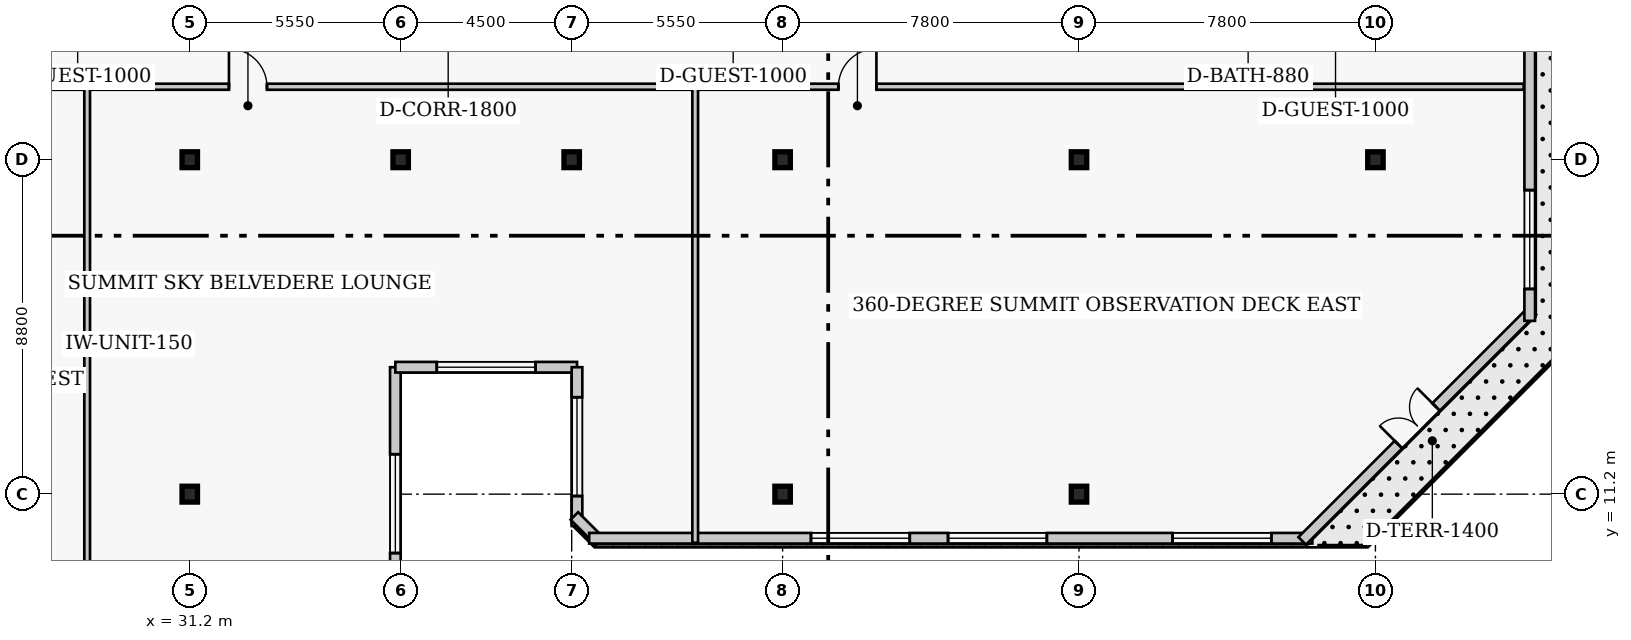
"""IFC4 building model, lengths in metres.
Left out: names, types, materials, properties, quantities, classifications, styles, units other than length and angle.
Written with IfcOpenShell. Run it as: python <this file> out.ifc"""

import sys

from ifc_helpers import new_model, si_unit, direction, frame, frame_2d, origin, origin_2d, place, context, subcontext, project, spatial, rectangle, i_section, extrude, element, fill, save


model = new_model("IFC4")
c1 = context("Model", 3, precision=1e-05, world=origin(), true_north=direction((0.0, 1.0)))
c2 = subcontext(c1, "Body", "Model", "MODEL_VIEW")
j1 = project(units=[si_unit("LENGTHUNIT", "METRE"), si_unit("PLANEANGLEUNIT", "RADIAN")], contexts=[c1])
p1 = place(None, origin())
s1 = spatial("IfcSite", under=j1, at=p1, CompositionType="ELEMENT")
p2 = place(p1, origin())
s2 = spatial("IfcBuilding", under=s1, at=p2, CompositionType="ELEMENT")
p3 = place(p2, frame((0.0, 0.0, 306.6)))
s3 = spatial("IfcBuildingStorey", under=s2, at=p3, CompositionType="ELEMENT", Elevation=306.6)
for number, where, z_axis, x_axis in (
    (1, (31.2, 11.2, 0.0), (0.0, 0.0, 1.0), (1.0, 0.0, 0.0)),
    (2, (31.2, 20.0, 0.0), (0.0, 0.0, 1.0), (1.0, 0.0, 0.0)),
    (3, (36.75, 20.0, 0.0), (0.0, 0.0, 1.0), (1.0, 0.0, 0.0)),
    (4, (41.25, 20.0, 0.0), (0.0, 0.0, 1.0), (1.0, 0.0, 0.0)),
    (5, (46.8, 11.2, 0.0), (0.0, 0.0, 1.0), (1.0, 0.0, 0.0)),
    (6, (46.8, 20.0, 0.0), (0.0, 0.0, 1.0), (1.0, 0.0, 0.0)),
    (7, (54.6, 11.2, 0.0), (0.0, 0.0, 1.0), (1.0, 0.0, 0.0)),
    (8, (54.6, 20.0, 0.0), (0.0, 0.0, 1.0), (1.0, 0.0, 0.0)),
    (9, (62.4, 20.0, 0.0), (0.0, 0.0, 1.0), (1.0, 0.0, 0.0)),
):
    element("IfcColumn", number, at=place(p3, frame(where, z_axis=z_axis, x_axis=x_axis)), inside=s3, PredefinedType="COLUMN", context=c2, shape_type="SweptSolid", body=[
        extrude(i_section(OverallWidth=0.406, OverallDepth=0.417, WebThickness=0.03, FlangeThickness=0.048, FilletRadius=0.017, at=origin_2d()), origin(), (0.0, 0.0, 1.0), 4.8),
    ])
p4 = place(p3, frame((36.61, 7.36, 0.0), z_axis=(0.0, 0.0, 1.0), x_axis=(0.0, 1.0, 0.0)))
e10 = element("IfcWall", 10, at=p4, inside=s3, PredefinedType="SOLIDWALL", context=c2, shape_type="SweptSolid", body=[
    extrude(rectangle(XDim=7.18, YDim=0.28, at=frame_2d((3.59, 0.0))), origin(), (0.0, 0.0, 1.0), 4.45),
])
p5 = place(p4, frame((2.29, 0.0, 0.65)))
e11 = element("IfcOpeningElement", 11, at=p5, cuts=e10, PredefinedType="OPENING", context=c2, shape_type="SweptSolid", body=[
    extrude(rectangle(XDim=2.6, YDim=2.2, at=frame_2d((1.3, 1.1))), frame((0.0, 0.15, 0.0), z_axis=(0.0, -1.0, 0.0), x_axis=(1.0, 0.0, 0.0)), (0.0, 0.0, 1.0), 0.3),
])
p6 = place(p3, frame((36.61, 14.54, 0.0), z_axis=(0.0, 0.0, 1.0), x_axis=(1.0, 0.0, 0.0)))
e12 = element("IfcWall", 12, at=p6, inside=s3, PredefinedType="SOLIDWALL", context=c2, shape_type="SweptSolid", body=[
    extrude(rectangle(XDim=4.78, YDim=0.28, at=frame_2d((2.39, 0.0))), origin(), (0.0, 0.0, 1.0), 4.45),
])
p7 = place(p6, frame((1.09, 0.0, 0.65)))
e13 = element("IfcOpeningElement", 13, at=p7, cuts=e12, PredefinedType="OPENING", context=c2, shape_type="SweptSolid", body=[
    extrude(rectangle(XDim=2.6, YDim=2.2, at=frame_2d((1.3, 1.1))), frame((0.0, 0.15, 0.0), z_axis=(0.0, -1.0, 0.0), x_axis=(1.0, 0.0, 0.0)), (0.0, 0.0, 1.0), 0.3),
])
p8 = place(p3, frame((41.39, 14.54, 0.0), z_axis=(0.0, 0.0, 1.0), x_axis=(0.0, -1.0, 0.0)))
e14 = element("IfcWall", 14, at=p8, inside=s3, PredefinedType="SOLIDWALL", context=c2, shape_type="SweptSolid", body=[
    extrude(rectangle(XDim=4.18, YDim=0.28, at=frame_2d((2.09, 0.0))), origin(), (0.0, 0.0, 1.0), 4.45),
])
p9 = place(p8, frame((0.79, 0.0, 0.65)))
e15 = element("IfcOpeningElement", 15, at=p9, cuts=e14, PredefinedType="OPENING", context=c2, shape_type="SweptSolid", body=[
    extrude(rectangle(XDim=2.6, YDim=2.2, at=frame_2d((1.3, 1.1))), frame((0.0, 0.15, 0.0), z_axis=(0.0, -1.0, 0.0), x_axis=(1.0, 0.0, 0.0)), (0.0, 0.0, 1.0), 0.3),
])
p10 = place(p3, frame((41.321, 10.627, 0.0), z_axis=(0.0, 0.0, 1.0), x_axis=(0.707106781187, -0.707106781187, 0.0)))
e16 = element("IfcWall", 16, at=p10, inside=s3, PredefinedType="SOLIDWALL", context=c2, shape_type="SweptSolid", body=[
    extrude(rectangle(XDim=0.928, YDim=0.28, at=frame_2d((0.464, 0.0))), origin(), (0.0, 0.0, 1.0), 4.45),
])
p11 = place(p3, frame((41.71, 10.04, 0.0), z_axis=(0.0, 0.0, 1.0), x_axis=(1.0, 0.0, 0.0)))
e17 = element("IfcWall", 17, at=p11, inside=s3, PredefinedType="SOLIDWALL", context=c2, shape_type="SweptSolid", body=[
    extrude(rectangle(XDim=19.03, YDim=0.28, at=frame_2d((9.515, 0.0))), origin(), (0.0, 0.0, 1.0), 4.45),
])
p12 = place(p11, frame((5.836, 0.0, 0.65)))
e18 = element("IfcOpeningElement", 18, at=p12, cuts=e17, PredefinedType="OPENING", context=c2, shape_type="SweptSolid", body=[
    extrude(rectangle(XDim=2.6, YDim=2.2, at=frame_2d((1.3, 1.1))), frame((0.0, 0.15, 0.0), z_axis=(0.0, -1.0, 0.0), x_axis=(1.0, 0.0, 0.0)), (0.0, 0.0, 1.0), 0.3),
])
p13 = place(p11, frame((9.444, 0.0, 0.65)))
e19 = element("IfcOpeningElement", 19, at=p13, cuts=e17, PredefinedType="OPENING", context=c2, shape_type="SweptSolid", body=[
    extrude(rectangle(XDim=2.6, YDim=2.2, at=frame_2d((1.3, 1.1))), frame((0.0, 0.15, 0.0), z_axis=(0.0, -1.0, 0.0), x_axis=(1.0, 0.0, 0.0)), (0.0, 0.0, 1.0), 0.3),
])
p14 = place(p11, frame((15.351, 0.0, 0.65)))
e20 = element("IfcOpeningElement", 20, at=p14, cuts=e17, PredefinedType="OPENING", context=c2, shape_type="SweptSolid", body=[
    extrude(rectangle(XDim=2.6, YDim=2.2, at=frame_2d((1.3, 1.1))), frame((0.0, 0.15, 0.0), z_axis=(0.0, -1.0, 0.0), x_axis=(1.0, 0.0, 0.0)), (0.0, 0.0, 1.0), 0.3),
])
p15 = place(p3, frame((60.473, 9.971, 0.0), z_axis=(0.0, 0.0, 1.0), x_axis=(0.707106781187, 0.707106781187, 0.0)))
e21 = element("IfcWall", 21, at=p15, inside=s3, PredefinedType="SOLIDWALL", context=c2, shape_type="SweptSolid", body=[
    extrude(rectangle(XDim=8.565, YDim=0.28, at=frame_2d((4.283, 0.0))), origin(), (0.0, 0.0, 1.0), 4.45),
])
p16 = place(p15, frame((3.583, 0.0, 0.0)))
e22 = element("IfcOpeningElement", 22, at=p16, cuts=e21, PredefinedType="OPENING", context=c2, shape_type="SweptSolid", body=[
    extrude(rectangle(XDim=1.4, YDim=2.15, at=frame_2d((0.7, 1.075))), frame((0.0, 0.15, 0.0), z_axis=(0.0, -1.0, 0.0), x_axis=(1.0, 0.0, 0.0)), (0.0, 0.0, 1.0), 0.3),
])
p17 = place(p3, frame((66.46, 15.76, 0.0), z_axis=(0.0, 0.0, 1.0), x_axis=(0.0, 1.0, 0.0)))
e23 = element("IfcWall", 23, at=p17, inside=s3, PredefinedType="SOLIDWALL", context=c2, shape_type="SweptSolid", body=[
    extrude(rectangle(XDim=25.68, YDim=0.28, at=frame_2d((12.84, 0.0))), origin(), (0.0, 0.0, 1.0), 4.45),
])
p18 = place(p17, frame((0.84, 0.0, 0.65)))
e24 = element("IfcOpeningElement", 24, at=p18, cuts=e23, PredefinedType="OPENING", context=c2, shape_type="SweptSolid", body=[
    extrude(rectangle(XDim=2.6, YDim=2.2, at=frame_2d((1.3, 1.1))), frame((0.0, 0.15, 0.0), z_axis=(0.0, -1.0, 0.0), x_axis=(1.0, 0.0, 0.0)), (0.0, 0.0, 1.0), 0.3),
])
p19 = place(p17, frame((9.4, 0.0, 0.65)))
e25 = element("IfcOpeningElement", 25, at=p19, cuts=e23, PredefinedType="OPENING", context=c2, shape_type="SweptSolid", body=[
    extrude(rectangle(XDim=2.6, YDim=2.2, at=frame_2d((1.3, 1.1))), frame((0.0, 0.15, 0.0), z_axis=(0.0, -1.0, 0.0), x_axis=(1.0, 0.0, 0.0)), (0.0, 0.0, 1.0), 0.3),
])
p20 = place(p17, frame((13.68, 0.0, 0.65)))
e26 = element("IfcOpeningElement", 26, at=p20, cuts=e23, PredefinedType="OPENING", context=c2, shape_type="SweptSolid", body=[
    extrude(rectangle(XDim=2.6, YDim=2.2, at=frame_2d((1.3, 1.1))), frame((0.0, 0.15, 0.0), z_axis=(0.0, -1.0, 0.0), x_axis=(1.0, 0.0, 0.0)), (0.0, 0.0, 1.0), 0.3),
])
p21 = place(p17, frame((17.96, 0.0, 0.65)))
e27 = element("IfcOpeningElement", 27, at=p21, cuts=e23, PredefinedType="OPENING", context=c2, shape_type="SweptSolid", body=[
    extrude(rectangle(XDim=2.6, YDim=2.2, at=frame_2d((1.3, 1.1))), frame((0.0, 0.15, 0.0), z_axis=(0.0, -1.0, 0.0), x_axis=(1.0, 0.0, 0.0)), (0.0, 0.0, 1.0), 0.3),
])
p22 = place(p17, frame((22.24, 0.0, 0.65)))
e28 = element("IfcOpeningElement", 28, at=p22, cuts=e23, PredefinedType="OPENING", context=c2, shape_type="SweptSolid", body=[
    extrude(rectangle(XDim=2.6, YDim=2.2, at=frame_2d((1.3, 1.1))), frame((0.0, 0.15, 0.0), z_axis=(0.0, -1.0, 0.0), x_axis=(1.0, 0.0, 0.0)), (0.0, 0.0, 1.0), 0.3),
])
p23 = place(p3, frame((11.7, 21.92, 0.0), z_axis=(0.0, 0.0, 1.0), x_axis=(1.0, 0.0, 0.0)))
e29 = element("IfcWall", 29, at=p23, inside=s3, PredefinedType="PARTITIONING", context=c2, shape_type="SweptSolid", body=[
    extrude(rectangle(XDim=54.6, YDim=0.16, at=frame_2d((27.3, 0.0))), origin(), (0.0, 0.0, 1.0), 4.45),
])
p24 = place(p23, frame((8.0, 0.0, 0.0)))
e30 = element("IfcOpeningElement", 30, at=p24, cuts=e29, PredefinedType="OPENING", context=c2, shape_type="SweptSolid", body=[
    extrude(rectangle(XDim=1.0, YDim=2.15, at=frame_2d((0.5, 1.075))), frame((0.0, 0.09, 0.0), z_axis=(0.0, -1.0, 0.0), x_axis=(1.0, 0.0, 0.0)), (0.0, 0.0, 1.0), 0.18),
])
p25 = place(p23, frame((20.531, 0.0, 0.0)))
e31 = element("IfcOpeningElement", 31, at=p25, cuts=e29, PredefinedType="OPENING", context=c2, shape_type="SweptSolid", body=[
    extrude(rectangle(XDim=1.0, YDim=2.15, at=frame_2d((0.5, 1.075))), frame((0.0, 0.09, 0.0), z_axis=(0.0, -1.0, 0.0), x_axis=(1.0, 0.0, 0.0)), (0.0, 0.0, 1.0), 0.18),
])
p26 = place(p23, frame((36.569, 0.0, 0.0)))
e32 = element("IfcOpeningElement", 32, at=p26, cuts=e29, PredefinedType="OPENING", context=c2, shape_type="SweptSolid", body=[
    extrude(rectangle(XDim=1.0, YDim=2.15, at=frame_2d((0.5, 1.075))), frame((0.0, 0.09, 0.0), z_axis=(0.0, -1.0, 0.0), x_axis=(1.0, 0.0, 0.0)), (0.0, 0.0, 1.0), 0.18),
])
p27 = place(p3, frame((28.5, 8.4, 0.0), z_axis=(0.0, 0.0, 1.0), x_axis=(0.0, 1.0, 0.0)))
e33 = element("IfcWall", 33, at=p27, inside=s3, PredefinedType="PARTITIONING", context=c2, shape_type="SweptSolid", body=[
    extrude(rectangle(XDim=13.52, YDim=0.15, at=frame_2d((6.76, 0.0))), origin(), (0.0, 0.0, 1.0), 4.45),
])
p28 = place(p3, frame((44.5, 9.92, 0.0), z_axis=(0.0, 0.0, 1.0), x_axis=(0.0, 1.0, 0.0)))
e34 = element("IfcWall", 34, at=p28, inside=s3, PredefinedType="PARTITIONING", context=c2, shape_type="SweptSolid", body=[
    extrude(rectangle(XDim=12.0, YDim=0.15, at=frame_2d((6.0, 0.0))), origin(), (0.0, 0.0, 1.0), 4.45),
])
p29 = place(p5, origin())
e35 = element("IfcWindow", 35, at=p29, inside=s3, PartitioningType="SINGLE_PANEL", PredefinedType="WINDOW", context=c2, shape_type="SweptSolid", body=[
    extrude(rectangle(XDim=2.6, YDim=2.2, at=frame_2d((1.3, 1.1))), frame((0.0, 0.03, 0.0), z_axis=(0.0, -1.0, 0.0), x_axis=(1.0, 0.0, 0.0)), (0.0, 0.0, 1.0), 0.06),
])
fill(e11, e35)
p30 = place(p7, origin())
e36 = element("IfcWindow", 36, at=p30, inside=s3, PartitioningType="SINGLE_PANEL", PredefinedType="WINDOW", context=c2, shape_type="SweptSolid", body=[
    extrude(rectangle(XDim=2.6, YDim=2.2, at=frame_2d((1.3, 1.1))), frame((0.0, 0.03, 0.0), z_axis=(0.0, -1.0, 0.0), x_axis=(1.0, 0.0, 0.0)), (0.0, 0.0, 1.0), 0.06),
])
fill(e13, e36)
p31 = place(p9, origin())
e37 = element("IfcWindow", 37, at=p31, inside=s3, PartitioningType="SINGLE_PANEL", PredefinedType="WINDOW", context=c2, shape_type="SweptSolid", body=[
    extrude(rectangle(XDim=2.6, YDim=2.2, at=frame_2d((1.3, 1.1))), frame((0.0, 0.03, 0.0), z_axis=(0.0, -1.0, 0.0), x_axis=(1.0, 0.0, 0.0)), (0.0, 0.0, 1.0), 0.06),
])
fill(e15, e37)
p32 = place(p12, origin())
e38 = element("IfcWindow", 38, at=p32, inside=s3, PartitioningType="SINGLE_PANEL", PredefinedType="WINDOW", context=c2, shape_type="SweptSolid", body=[
    extrude(rectangle(XDim=2.6, YDim=2.2, at=frame_2d((1.3, 1.1))), frame((0.0, 0.03, 0.0), z_axis=(0.0, -1.0, 0.0), x_axis=(1.0, 0.0, 0.0)), (0.0, 0.0, 1.0), 0.06),
])
fill(e18, e38)
p33 = place(p13, origin())
e39 = element("IfcWindow", 39, at=p33, inside=s3, PartitioningType="SINGLE_PANEL", PredefinedType="WINDOW", context=c2, shape_type="SweptSolid", body=[
    extrude(rectangle(XDim=2.6, YDim=2.2, at=frame_2d((1.3, 1.1))), frame((0.0, 0.03, 0.0), z_axis=(0.0, -1.0, 0.0), x_axis=(1.0, 0.0, 0.0)), (0.0, 0.0, 1.0), 0.06),
])
fill(e19, e39)
p34 = place(p14, origin())
e40 = element("IfcWindow", 40, at=p34, inside=s3, PartitioningType="SINGLE_PANEL", PredefinedType="WINDOW", context=c2, shape_type="SweptSolid", body=[
    extrude(rectangle(XDim=2.6, YDim=2.2, at=frame_2d((1.3, 1.1))), frame((0.0, 0.03, 0.0), z_axis=(0.0, -1.0, 0.0), x_axis=(1.0, 0.0, 0.0)), (0.0, 0.0, 1.0), 0.06),
])
fill(e20, e40)
p35 = place(p16, origin())
e41 = element("IfcDoor", 41, at=p35, inside=s3, OperationType="DOUBLE_DOOR_SINGLE_SWING", PredefinedType="DOOR", context=c2, shape_type="SweptSolid", body=[
    extrude(rectangle(XDim=1.4, YDim=2.15, at=frame_2d((0.7, 1.075))), frame((0.0, 0.025, 0.0), z_axis=(0.0, -1.0, 0.0), x_axis=(1.0, 0.0, 0.0)), (0.0, 0.0, 1.0), 0.05),
])
fill(e22, e41)
p36 = place(p18, origin())
e42 = element("IfcWindow", 42, at=p36, inside=s3, PartitioningType="SINGLE_PANEL", PredefinedType="WINDOW", context=c2, shape_type="SweptSolid", body=[
    extrude(rectangle(XDim=2.6, YDim=2.2, at=frame_2d((1.3, 1.1))), frame((0.0, 0.03, 0.0), z_axis=(0.0, -1.0, 0.0), x_axis=(1.0, 0.0, 0.0)), (0.0, 0.0, 1.0), 0.06),
])
fill(e24, e42)
p37 = place(p25, origin())
e43 = element("IfcDoor", 43, at=p37, inside=s3, OperationType="SINGLE_SWING_LEFT", PredefinedType="DOOR", context=c2, shape_type="SweptSolid", body=[
    extrude(rectangle(XDim=1.0, YDim=2.15, at=frame_2d((0.5, 1.075))), frame((0.0, 0.025, 0.0), z_axis=(0.0, -1.0, 0.0), x_axis=(1.0, 0.0, 0.0)), (0.0, 0.0, 1.0), 0.05),
])
fill(e31, e43)
p38 = place(p26, origin())
e44 = element("IfcDoor", 44, at=p38, inside=s3, OperationType="SINGLE_SWING_RIGHT", PredefinedType="DOOR", context=c2, shape_type="SweptSolid", body=[
    extrude(rectangle(XDim=1.0, YDim=2.15, at=frame_2d((0.5, 1.075))), frame((0.0, 0.025, 0.0), z_axis=(0.0, -1.0, 0.0), x_axis=(1.0, 0.0, 0.0)), (0.0, 0.0, 1.0), 0.05),
])
fill(e32, e44)
save(model, sys.argv[1])
